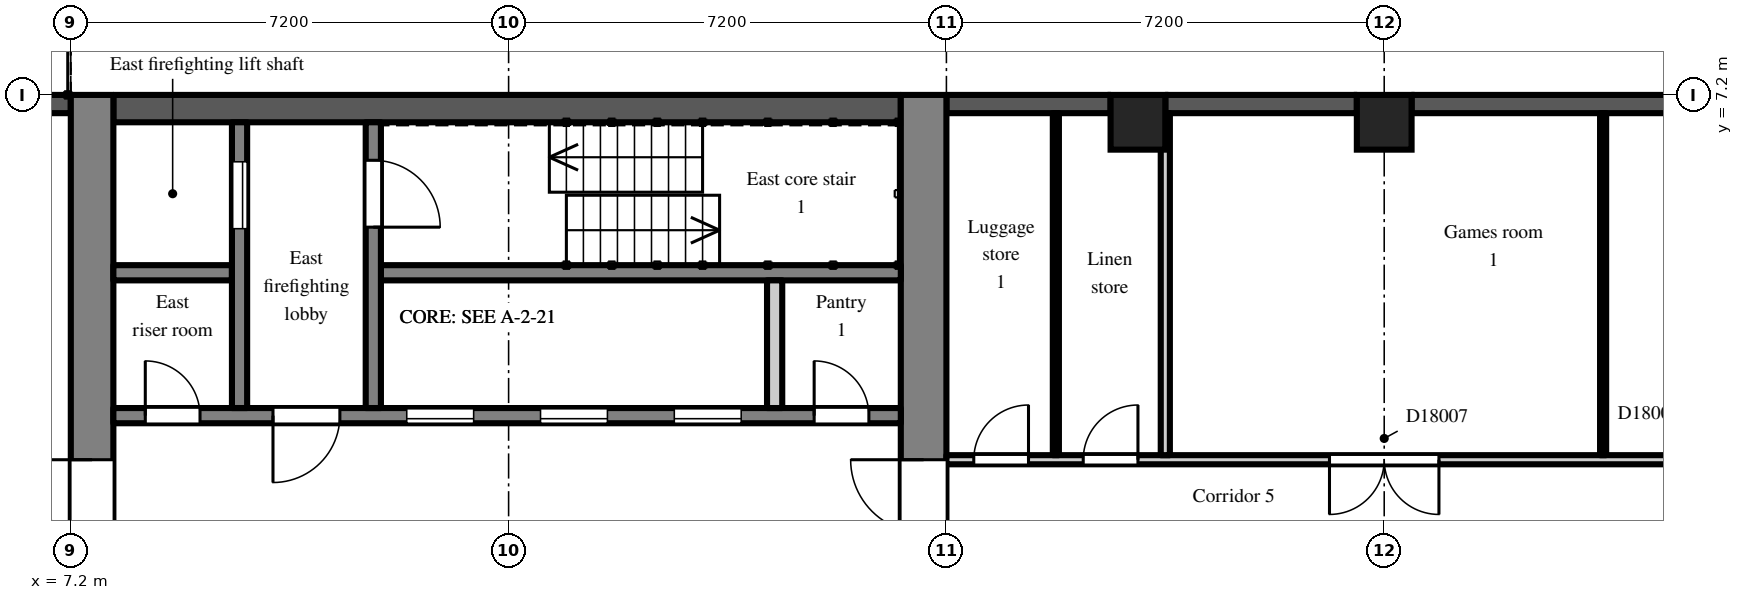
"""IFC4 building model, lengths in metres.
Left out: names, types, materials, properties, quantities, classifications, styles, units other than length and angle.
Written with IfcOpenShell. Run it as: python <this file> out.ifc"""

import sys

from ifc_helpers import new_model, si_unit, direction, frame, frame_2d, origin, origin_2d, place, context, subcontext, project, spatial, rectangle, extrude, element, fill, save


model = new_model("IFC4")
c1 = context("Model", 3, precision=1e-05, world=origin(), true_north=direction((0.0, 1.0)))
c2 = subcontext(c1, "Body", "Model", "MODEL_VIEW")
j1 = project(units=[si_unit("LENGTHUNIT", "METRE"), si_unit("PLANEANGLEUNIT", "RADIAN")], contexts=[c1])
p1 = place(None, origin())
s1 = spatial("IfcSite", under=j1, at=p1, CompositionType="ELEMENT")
p2 = place(p1, origin())
s2 = spatial("IfcBuilding", under=s1, at=p2, CompositionType="ELEMENT")
p3 = place(p2, frame((0.0, 0.0, 123.3)))
s3 = spatial("IfcBuildingStorey", under=s2, at=p3, CompositionType="ELEMENT", Elevation=123.3)
for number, where, z_axis, x_axis in (
    (1, (24.75, 6.75, 0.0), (0.0, 0.0, 1.0), (1.0, 0.0, 0.0)),
    (2, (28.8, 6.75, 0.0), (0.0, 0.0, 1.0), (1.0, 0.0, 0.0)),
):
    element("IfcColumn", number, at=place(p3, frame(where, z_axis=z_axis, x_axis=x_axis)), inside=s3, PredefinedType="COLUMN", context=c2, shape_type="SweptSolid", body=[
        extrude(rectangle(XDim=0.9, YDim=0.9, at=origin_2d()), origin(), (0.0, 0.0, 1.0), 3.0),
    ])
p4 = place(p3, frame((35.55, 7.05, 0.0), z_axis=(0.0, 0.0, 1.0), x_axis=(-1.0, 0.0, 0.0)))
e3 = element("IfcWall", 3, at=p4, inside=s3, PredefinedType="SOLIDWALL", context=c2, shape_type="SweptSolid", body=[
    extrude(rectangle(XDim=6.3, YDim=0.3, at=frame_2d((3.15, 0.0))), origin(), (0.0, 0.0, 1.0), 2.2),
])
p5 = place(p3, frame((28.35, 7.05, 0.0), z_axis=(0.0, 0.0, 1.0), x_axis=(-1.0, 0.0, 0.0)))
e4 = element("IfcWall", 4, at=p5, inside=s3, PredefinedType="SOLIDWALL", context=c2, shape_type="SweptSolid", body=[
    extrude(rectangle(XDim=3.15, YDim=0.3, at=frame_2d((1.575, 0.0))), origin(), (0.0, 0.0, 1.0), 2.2),
])
p6 = place(p3, frame((24.3, 7.05, 0.0), z_axis=(0.0, 0.0, 1.0), x_axis=(-1.0, 0.0, 0.0)))
e5 = element("IfcWall", 5, at=p6, inside=s3, PredefinedType="SOLIDWALL", context=c2, shape_type="SweptSolid", body=[
    extrude(rectangle(XDim=2.7, YDim=0.3, at=frame_2d((1.35, 0.0))), origin(), (0.0, 0.0, 1.0), 2.2),
])
p7 = place(p3, frame((7.2, 7.05, 0.0), z_axis=(0.0, 0.0, 1.0), x_axis=(-1.0, 0.0, 0.0)))
e6 = element("IfcWall", 6, at=p7, inside=s3, PredefinedType="SOLIDWALL", context=c2, shape_type="SweptSolid", body=[
    extrude(rectangle(XDim=3.0, YDim=0.3, at=frame_2d((1.5, 0.0))), origin(), (0.0, 0.0, 1.0), 2.2),
])
p8 = place(p3, frame((7.55, -7.2, 0.0), z_axis=(0.0, 0.0, 1.0), x_axis=(0.0, 1.0, 0.0)))
e7 = element("IfcWall", 7, at=p8, inside=s3, PredefinedType="SHEAR", context=c2, shape_type="SweptSolid", body=[
    extrude(rectangle(XDim=14.4, YDim=0.7, at=frame_2d((7.2, 0.0))), origin(), (0.0, 0.0, 1.0), 2.6),
])
p9 = place(p8, frame((6.0, 0.0, 0.0)))
e8 = element("IfcOpeningElement", 8, at=p9, cuts=e7, PredefinedType="OPENING", context=c2, shape_type="SweptSolid", body=[
    extrude(rectangle(XDim=2.4, YDim=2.2, at=frame_2d((1.2, 1.1))), frame((0.0, 0.36, 0.0), z_axis=(0.0, -1.0, 0.0), x_axis=(1.0, 0.0, 0.0)), (0.0, 0.0, 1.0), 0.72),
])
p10 = place(p3, frame((21.225, -7.2, 0.0), z_axis=(0.0, 0.0, 1.0), x_axis=(0.0, 1.0, 0.0)))
e9 = element("IfcWall", 9, at=p10, inside=s3, PredefinedType="SHEAR", context=c2, shape_type="SweptSolid", body=[
    extrude(rectangle(XDim=14.4, YDim=0.75, at=frame_2d((7.2, 0.0))), origin(), (0.0, 0.0, 1.0), 2.6),
])
p11 = place(p10, frame((6.0, 0.0, 0.0)))
e10 = element("IfcOpeningElement", 10, at=p11, cuts=e9, PredefinedType="OPENING", context=c2, shape_type="SweptSolid", body=[
    extrude(rectangle(XDim=2.4, YDim=2.2, at=frame_2d((1.2, 1.1))), frame((0.0, 0.385, 0.0), z_axis=(0.0, -1.0, 0.0), x_axis=(1.0, 0.0, 0.0)), (0.0, 0.0, 1.0), 0.77),
])
p12 = place(p3, frame((7.9, 6.975, 0.0), z_axis=(0.0, 0.0, 1.0), x_axis=(1.0, 0.0, 0.0)))
e11 = element("IfcWall", 11, at=p12, inside=s3, PredefinedType="SHEAR", context=c2, shape_type="SweptSolid", body=[
    extrude(rectangle(XDim=12.95, YDim=0.45, at=frame_2d((6.475, 0.0))), origin(), (0.0, 0.0, 1.0), 2.6),
])
p13 = place(p3, frame((7.9, 1.925, 0.0), z_axis=(0.0, 0.0, 1.0), x_axis=(1.0, 0.0, 0.0)))
e12 = element("IfcWall", 12, at=p13, inside=s3, PredefinedType="SHEAR", context=c2, shape_type="SweptSolid", body=[
    extrude(rectangle(XDim=12.95, YDim=0.25, at=frame_2d((6.475, 0.0))), origin(), (0.0, 0.0, 1.0), 2.6),
])
p14 = place(p13, frame((4.825, 0.0, 0.0)))
e13 = element("IfcOpeningElement", 13, at=p14, cuts=e12, PredefinedType="OPENING", context=c2, shape_type="SweptSolid", body=[
    extrude(rectangle(XDim=1.1, YDim=2.1, at=frame_2d((0.55, 1.05))), frame((0.0, 0.135, 0.0), z_axis=(0.0, -1.0, 0.0), x_axis=(1.0, 0.0, 0.0)), (0.0, 0.0, 1.0), 0.27),
])
p15 = place(p13, frame((7.025, 0.0, 0.0)))
e14 = element("IfcOpeningElement", 14, at=p15, cuts=e12, PredefinedType="OPENING", context=c2, shape_type="SweptSolid", body=[
    extrude(rectangle(XDim=1.1, YDim=2.1, at=frame_2d((0.55, 1.05))), frame((0.0, 0.135, 0.0), z_axis=(0.0, -1.0, 0.0), x_axis=(1.0, 0.0, 0.0)), (0.0, 0.0, 1.0), 0.27),
])
p16 = place(p13, frame((9.225, 0.0, 0.0)))
e15 = element("IfcOpeningElement", 15, at=p16, cuts=e12, PredefinedType="OPENING", context=c2, shape_type="SweptSolid", body=[
    extrude(rectangle(XDim=1.1, YDim=2.1, at=frame_2d((0.55, 1.05))), frame((0.0, 0.135, 0.0), z_axis=(0.0, -1.0, 0.0), x_axis=(1.0, 0.0, 0.0)), (0.0, 0.0, 1.0), 0.27),
])
p17 = place(p13, frame((0.525, 0.0, 0.0)))
e16 = element("IfcOpeningElement", 16, at=p17, cuts=e12, PredefinedType="OPENING", context=c2, shape_type="SweptSolid", body=[
    extrude(rectangle(XDim=0.9, YDim=2.1, at=frame_2d((0.45, 1.05))), frame((0.0, 0.135, 0.0), z_axis=(0.0, -1.0, 0.0), x_axis=(1.0, 0.0, 0.0)), (0.0, 0.0, 1.0), 0.27),
])
p18 = place(p13, frame((2.625, 0.0, 0.0)))
e17 = element("IfcOpeningElement", 17, at=p18, cuts=e12, PredefinedType="OPENING", context=c2, shape_type="SweptSolid", body=[
    extrude(rectangle(XDim=1.1, YDim=2.1, at=frame_2d((0.55, 1.05))), frame((0.0, 0.135, 0.0), z_axis=(0.0, -1.0, 0.0), x_axis=(1.0, 0.0, 0.0)), (0.0, 0.0, 1.0), 0.27),
])
p19 = place(p13, frame((11.525, 0.0, 0.0)))
e18 = element("IfcOpeningElement", 18, at=p19, cuts=e12, PredefinedType="OPENING", context=c2, shape_type="SweptSolid", body=[
    extrude(rectangle(XDim=0.9, YDim=2.1, at=frame_2d((0.45, 1.05))), frame((0.0, 0.135, 0.0), z_axis=(0.0, -1.0, 0.0), x_axis=(1.0, 0.0, 0.0)), (0.0, 0.0, 1.0), 0.27),
])
p20 = place(p3, frame((7.9, 4.275, 0.0), z_axis=(0.0, 0.0, 1.0), x_axis=(1.0, 0.0, 0.0)))
e19 = element("IfcWall", 19, at=p20, inside=s3, PredefinedType="SHEAR", context=c2, shape_type="SweptSolid", body=[
    extrude(rectangle(XDim=1.95, YDim=0.25, at=frame_2d((0.975, 0.0))), origin(), (0.0, 0.0, 1.0), 2.6),
])
p21 = place(p3, frame((12.3, 4.275, 0.0), z_axis=(0.0, 0.0, 1.0), x_axis=(1.0, 0.0, 0.0)))
e20 = element("IfcWall", 20, at=p21, inside=s3, PredefinedType="SHEAR", context=c2, shape_type="SweptSolid", body=[
    extrude(rectangle(XDim=8.55, YDim=0.25, at=frame_2d((4.275, 0.0))), origin(), (0.0, 0.0, 1.0), 2.6),
])
p22 = place(p3, frame((9.975, 2.05, 0.0), z_axis=(0.0, 0.0, 1.0), x_axis=(0.0, 1.0, 0.0)))
e21 = element("IfcWall", 21, at=p22, inside=s3, PredefinedType="SHEAR", context=c2, shape_type="SweptSolid", body=[
    extrude(rectangle(XDim=4.7, YDim=0.25, at=frame_2d((2.35, 0.0))), origin(), (0.0, 0.0, 1.0), 2.6),
])
p23 = place(p22, frame((2.95, 0.0, 0.0)))
e22 = element("IfcOpeningElement", 22, at=p23, cuts=e21, PredefinedType="OPENING", context=c2, shape_type="SweptSolid", body=[
    extrude(rectangle(XDim=1.1, YDim=2.1, at=frame_2d((0.55, 1.05))), frame((0.0, 0.135, 0.0), z_axis=(0.0, -1.0, 0.0), x_axis=(1.0, 0.0, 0.0)), (0.0, 0.0, 1.0), 0.27),
])
p24 = place(p3, frame((12.175, 2.05, 0.0), z_axis=(0.0, 0.0, 1.0), x_axis=(0.0, 1.0, 0.0)))
e23 = element("IfcWall", 23, at=p24, inside=s3, PredefinedType="SHEAR", context=c2, shape_type="SweptSolid", body=[
    extrude(rectangle(XDim=4.7, YDim=0.25, at=frame_2d((2.35, 0.0))), origin(), (0.0, 0.0, 1.0), 2.6),
])
p25 = place(p24, frame((2.975, 0.0, 0.0)))
e24 = element("IfcOpeningElement", 24, at=p25, cuts=e23, PredefinedType="OPENING", context=c2, shape_type="SweptSolid", body=[
    extrude(rectangle(XDim=1.1, YDim=2.1, at=frame_2d((0.55, 1.05))), frame((0.0, 0.135, 0.0), z_axis=(0.0, -1.0, 0.0), x_axis=(1.0, 0.0, 0.0)), (0.0, 0.0, 1.0), 0.27),
])
p26 = place(p3, frame((18.775, 2.05, 0.0), z_axis=(0.0, 0.0, 1.0), x_axis=(0.0, 1.0, 0.0)))
e25 = element("IfcWall", 25, at=p26, inside=s3, PredefinedType="PARTITIONING", context=c2, shape_type="SweptSolid", body=[
    extrude(rectangle(XDim=2.1, YDim=0.25, at=frame_2d((1.05, 0.0))), origin(), (0.0, 0.0, 1.0), 2.6),
])
p27 = place(p3, frame((21.6, 1.2, 0.0), z_axis=(0.0, 0.0, 1.0), x_axis=(1.0, 0.0, 0.0)))
e26 = element("IfcWall", 26, at=p27, inside=s3, PredefinedType="PARTITIONING", context=c2, shape_type="SweptSolid", body=[
    extrude(rectangle(XDim=14.9, YDim=0.15, at=frame_2d((7.45, 0.0))), origin(), (0.0, 0.0, 1.0), 2.6),
])
p28 = place(p27, frame((0.45, 0.0, 0.0)))
e27 = element("IfcOpeningElement", 27, at=p28, cuts=e26, PredefinedType="OPENING", context=c2, shape_type="SweptSolid", body=[
    extrude(rectangle(XDim=0.9, YDim=2.1, at=frame_2d((0.45, 1.05))), frame((0.0, 0.085, 0.0), z_axis=(0.0, -1.0, 0.0), x_axis=(1.0, 0.0, 0.0)), (0.0, 0.0, 1.0), 0.17),
])
p29 = place(p27, frame((2.25, 0.0, 0.0)))
e28 = element("IfcOpeningElement", 28, at=p29, cuts=e26, PredefinedType="OPENING", context=c2, shape_type="SweptSolid", body=[
    extrude(rectangle(XDim=0.9, YDim=2.1, at=frame_2d((0.45, 1.05))), frame((0.0, 0.085, 0.0), z_axis=(0.0, -1.0, 0.0), x_axis=(1.0, 0.0, 0.0)), (0.0, 0.0, 1.0), 0.17),
])
p30 = place(p27, frame((6.3, 0.0, 0.0)))
e29 = element("IfcOpeningElement", 29, at=p30, cuts=e26, PredefinedType="OPENING", context=c2, shape_type="SweptSolid", body=[
    extrude(rectangle(XDim=1.8, YDim=2.1, at=frame_2d((0.9, 1.05))), frame((0.0, 0.085, 0.0), z_axis=(0.0, -1.0, 0.0), x_axis=(1.0, 0.0, 0.0)), (0.0, 0.0, 1.0), 0.17),
])
p31 = place(p27, frame((11.95, 0.0, 0.0)))
e30 = element("IfcOpeningElement", 30, at=p31, cuts=e26, PredefinedType="OPENING", context=c2, shape_type="SweptSolid", body=[
    extrude(rectangle(XDim=1.8, YDim=2.1, at=frame_2d((0.9, 1.05))), frame((0.0, 0.085, 0.0), z_axis=(0.0, -1.0, 0.0), x_axis=(1.0, 0.0, 0.0)), (0.0, 0.0, 1.0), 0.17),
])
p32 = place(p3, frame((23.4, 1.275, 0.0), z_axis=(0.0, 0.0, 1.0), x_axis=(0.0, 1.0, 0.0)))
e31 = element("IfcWall", 31, at=p32, inside=s3, PredefinedType="PARTITIONING", context=c2, shape_type="SweptSolid", body=[
    extrude(rectangle(XDim=5.625, YDim=0.1, at=frame_2d((2.812, 0.0))), origin(), (0.0, 0.0, 1.0), 2.6),
])
p33 = place(p3, frame((25.2, 1.275, 0.0), z_axis=(0.0, 0.0, 1.0), x_axis=(0.0, 1.0, 0.0)))
e32 = element("IfcWall", 32, at=p33, inside=s3, PredefinedType="PARTITIONING", context=c2, shape_type="SweptSolid", body=[
    extrude(rectangle(XDim=5.625, YDim=0.15, at=frame_2d((2.812, 0.0))), origin(), (0.0, 0.0, 1.0), 2.6),
])
p34 = place(p3, frame((32.4, 1.275, 0.0), z_axis=(0.0, 0.0, 1.0), x_axis=(0.0, 1.0, 0.0)))
e33 = element("IfcWall", 33, at=p34, inside=s3, PredefinedType="PARTITIONING", context=c2, shape_type="SweptSolid", body=[
    extrude(rectangle(XDim=5.625, YDim=0.1, at=frame_2d((2.812, 0.0))), origin(), (0.0, 0.0, 1.0), 2.6),
])
p35 = place(p14, origin())
e34 = element("IfcDoor", 34, at=p35, inside=s3, OperationType="SLIDING_TO_LEFT", PredefinedType="DOOR", context=c2, shape_type="SweptSolid", body=[
    extrude(rectangle(XDim=1.1, YDim=2.1, at=frame_2d((0.55, 1.05))), frame((0.0, 0.025, 0.0), z_axis=(0.0, -1.0, 0.0), x_axis=(1.0, 0.0, 0.0)), (0.0, 0.0, 1.0), 0.05),
])
fill(e13, e34)
p36 = place(p15, origin())
e35 = element("IfcDoor", 35, at=p36, inside=s3, OperationType="SLIDING_TO_LEFT", PredefinedType="DOOR", context=c2, shape_type="SweptSolid", body=[
    extrude(rectangle(XDim=1.1, YDim=2.1, at=frame_2d((0.55, 1.05))), frame((0.0, 0.025, 0.0), z_axis=(0.0, -1.0, 0.0), x_axis=(1.0, 0.0, 0.0)), (0.0, 0.0, 1.0), 0.05),
])
fill(e14, e35)
p37 = place(p16, origin())
e36 = element("IfcDoor", 36, at=p37, inside=s3, OperationType="SLIDING_TO_LEFT", PredefinedType="DOOR", context=c2, shape_type="SweptSolid", body=[
    extrude(rectangle(XDim=1.1, YDim=2.1, at=frame_2d((0.55, 1.05))), frame((0.0, 0.025, 0.0), z_axis=(0.0, -1.0, 0.0), x_axis=(1.0, 0.0, 0.0)), (0.0, 0.0, 1.0), 0.05),
])
fill(e15, e36)
p38 = place(p23, origin())
e37 = element("IfcDoor", 37, at=p38, inside=s3, OperationType="SLIDING_TO_LEFT", PredefinedType="DOOR", context=c2, shape_type="SweptSolid", body=[
    extrude(rectangle(XDim=1.1, YDim=2.1, at=frame_2d((0.55, 1.05))), frame((0.0, 0.025, 0.0), z_axis=(0.0, -1.0, 0.0), x_axis=(1.0, 0.0, 0.0)), (0.0, 0.0, 1.0), 0.05),
])
fill(e22, e37)
p39 = place(p25, frame((1.1, 0.0, 0.0), z_axis=(0.0, 0.0, 1.0), x_axis=(-1.0, 0.0, 0.0)))
e38 = element("IfcDoor", 38, at=p39, inside=s3, OperationType="SINGLE_SWING_RIGHT", PredefinedType="DOOR", context=c2, shape_type="SweptSolid", body=[
    extrude(rectangle(XDim=1.1, YDim=2.1, at=frame_2d((0.55, 1.05))), frame((0.0, 0.025, 0.0), z_axis=(0.0, -1.0, 0.0), x_axis=(1.0, 0.0, 0.0)), (0.0, 0.0, 1.0), 0.05),
])
fill(e24, e38)
p40 = place(p17, origin())
e39 = element("IfcDoor", 39, at=p40, inside=s3, OperationType="SINGLE_SWING_LEFT", PredefinedType="DOOR", context=c2, shape_type="SweptSolid", body=[
    extrude(rectangle(XDim=0.9, YDim=2.1, at=frame_2d((0.45, 1.05))), frame((0.0, 0.025, 0.0), z_axis=(0.0, -1.0, 0.0), x_axis=(1.0, 0.0, 0.0)), (0.0, 0.0, 1.0), 0.05),
])
fill(e16, e39)
p41 = place(p18, frame((1.1, 0.0, 0.0), z_axis=(0.0, 0.0, 1.0), x_axis=(-1.0, 0.0, 0.0)))
e40 = element("IfcDoor", 40, at=p41, inside=s3, OperationType="SINGLE_SWING_RIGHT", PredefinedType="DOOR", context=c2, shape_type="SweptSolid", body=[
    extrude(rectangle(XDim=1.1, YDim=2.1, at=frame_2d((0.55, 1.05))), frame((0.0, 0.025, 0.0), z_axis=(0.0, -1.0, 0.0), x_axis=(1.0, 0.0, 0.0)), (0.0, 0.0, 1.0), 0.05),
])
fill(e17, e40)
p42 = place(p9, origin())
e41 = element("IfcDoor", 41, at=p42, inside=s3, OperationType="DOUBLE_DOOR_DOUBLE_SWING", PredefinedType="DOOR", context=c2, shape_type="SweptSolid", body=[
    extrude(rectangle(XDim=2.4, YDim=2.2, at=frame_2d((1.2, 1.1))), frame((0.0, 0.025, 0.0), z_axis=(0.0, -1.0, 0.0), x_axis=(1.0, 0.0, 0.0)), (0.0, 0.0, 1.0), 0.05),
])
fill(e8, e41)
p43 = place(p11, origin())
e42 = element("IfcDoor", 42, at=p43, inside=s3, OperationType="DOUBLE_DOOR_DOUBLE_SWING", PredefinedType="DOOR", context=c2, shape_type="SweptSolid", body=[
    extrude(rectangle(XDim=2.4, YDim=2.2, at=frame_2d((1.2, 1.1))), frame((0.0, 0.025, 0.0), z_axis=(0.0, -1.0, 0.0), x_axis=(1.0, 0.0, 0.0)), (0.0, 0.0, 1.0), 0.05),
])
fill(e10, e42)
p44 = place(p19, origin())
e43 = element("IfcDoor", 43, at=p44, inside=s3, OperationType="SINGLE_SWING_LEFT", PredefinedType="DOOR", context=c2, shape_type="SweptSolid", body=[
    extrude(rectangle(XDim=0.9, YDim=2.1, at=frame_2d((0.45, 1.05))), frame((0.0, 0.025, 0.0), z_axis=(0.0, -1.0, 0.0), x_axis=(1.0, 0.0, 0.0)), (0.0, 0.0, 1.0), 0.05),
])
fill(e18, e43)
p45 = place(p28, origin())
e44 = element("IfcDoor", 44, at=p45, inside=s3, OperationType="SINGLE_SWING_RIGHT", PredefinedType="DOOR", context=c2, shape_type="SweptSolid", body=[
    extrude(rectangle(XDim=0.9, YDim=2.1, at=frame_2d((0.45, 1.05))), frame((0.0, 0.025, 0.0), z_axis=(0.0, -1.0, 0.0), x_axis=(1.0, 0.0, 0.0)), (0.0, 0.0, 1.0), 0.05),
])
fill(e27, e44)
p46 = place(p29, origin())
e45 = element("IfcDoor", 45, at=p46, inside=s3, OperationType="SINGLE_SWING_RIGHT", PredefinedType="DOOR", context=c2, shape_type="SweptSolid", body=[
    extrude(rectangle(XDim=0.9, YDim=2.1, at=frame_2d((0.45, 1.05))), frame((0.0, 0.025, 0.0), z_axis=(0.0, -1.0, 0.0), x_axis=(1.0, 0.0, 0.0)), (0.0, 0.0, 1.0), 0.05),
])
fill(e28, e45)
p47 = place(p30, frame((1.8, 0.0, 0.0), z_axis=(0.0, 0.0, 1.0), x_axis=(-1.0, 0.0, 0.0)))
e46 = element("IfcDoor", 46, at=p47, inside=s3, OperationType="DOUBLE_DOOR_DOUBLE_SWING", PredefinedType="DOOR", context=c2, shape_type="SweptSolid", body=[
    extrude(rectangle(XDim=1.8, YDim=2.1, at=frame_2d((0.9, 1.05))), frame((0.0, 0.025, 0.0), z_axis=(0.0, -1.0, 0.0), x_axis=(1.0, 0.0, 0.0)), (0.0, 0.0, 1.0), 0.05),
])
fill(e29, e46)
save(model, sys.argv[1])
